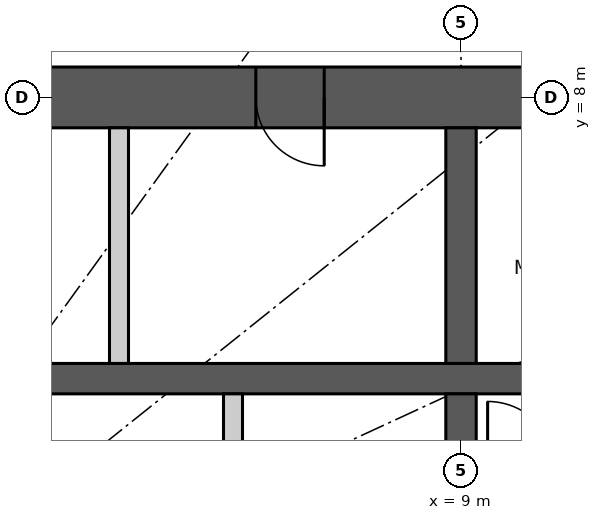
"""IFC4 building model, lengths in metres.
Left out: names, types, materials, properties, quantities, classifications, styles, units other than length and angle.
Written with IfcOpenShell. Run it as: python <this file> out.ifc"""

import sys

from ifc_helpers import new_model, si_unit, direction, frame, frame_2d, origin, place, context, subcontext, project, spatial, rectangle, extrude, element, fill, save


model = new_model("IFC4")
c1 = context("Model", 3, precision=1e-05, world=origin(), true_north=direction((0.0, 1.0)))
c2 = subcontext(c1, "Body", "Model", "MODEL_VIEW")
j1 = project(units=[si_unit("LENGTHUNIT", "METRE"), si_unit("PLANEANGLEUNIT", "RADIAN")], contexts=[c1])
p1 = place(None, origin())
s1 = spatial("IfcSite", under=j1, at=p1, CompositionType="ELEMENT")
p2 = place(p1, origin())
s2 = spatial("IfcBuilding", under=s1, at=p2, CompositionType="ELEMENT")
p3 = place(p2, frame((0.0, 0.0, 159.9)))
s3 = spatial("IfcBuildingStorey", under=s2, at=p3, CompositionType="ELEMENT", Elevation=159.9)
p4 = place(p3, frame((-12.4, 8.0, 0.0), z_axis=(0.0, 0.0, 1.0), x_axis=(1.0, 0.0, 0.0)))
e1 = element("IfcWall", 1, at=p4, inside=s3, PredefinedType="SHEAR", context=c2, shape_type="SweptSolid", body=[
    extrude(rectangle(XDim=24.8, YDim=0.8, at=frame_2d((12.4, 0.0))), origin(), (0.0, 0.0, 1.0), 3.3),
])
p5 = place(p4, frame((11.1, 0.0, 0.0)))
e2 = element("IfcOpeningElement", 2, at=p5, cuts=e1, PredefinedType="OPENING", context=c2, shape_type="SweptSolid", body=[
    extrude(rectangle(XDim=1.2, YDim=2.2, at=frame_2d((0.6, 1.1))), frame((0.0, 0.41, 0.0), z_axis=(0.0, -1.0, 0.0), x_axis=(1.0, 0.0, 0.0)), (0.0, 0.0, 1.0), 0.82),
])
p6 = place(p4, frame((18.7, 0.0, 0.0)))
e3 = element("IfcOpeningElement", 3, at=p6, cuts=e1, PredefinedType="OPENING", context=c2, shape_type="SweptSolid", body=[
    extrude(rectangle(XDim=0.9, YDim=2.2, at=frame_2d((0.45, 1.1))), frame((0.0, 0.41, 0.0), z_axis=(0.0, -1.0, 0.0), x_axis=(1.0, 0.0, 0.0)), (0.0, 0.0, 1.0), 0.82),
])
p7 = place(p3, frame((-11.6, 4.3, 0.0), z_axis=(0.0, 0.0, 1.0), x_axis=(1.0, 0.0, 0.0)))
e4 = element("IfcWall", 4, at=p7, inside=s3, PredefinedType="SHEAR", context=c2, shape_type="SweptSolid", body=[
    extrude(rectangle(XDim=23.2, YDim=0.4, at=frame_2d((11.6, 0.0))), origin(), (0.0, 0.0, 1.0), 3.3),
])
p8 = place(p3, frame((9.0, 4.5, 0.0), z_axis=(0.0, 0.0, 1.0), x_axis=(0.0, 1.0, 0.0)))
e5 = element("IfcWall", 5, at=p8, inside=s3, PredefinedType="SHEAR", context=c2, shape_type="SweptSolid", body=[
    extrude(rectangle(XDim=3.1, YDim=0.4, at=frame_2d((1.55, 0.0))), origin(), (0.0, 0.0, 1.0), 3.3),
])
p9 = place(p3, frame((9.0, 1.75, 0.0), z_axis=(0.0, 0.0, 1.0), x_axis=(0.0, 1.0, 0.0)))
e6 = element("IfcWall", 6, at=p9, inside=s3, PredefinedType="SHEAR", context=c2, shape_type="SweptSolid", body=[
    extrude(rectangle(XDim=2.35, YDim=0.4, at=frame_2d((1.175, 0.0))), origin(), (0.0, 0.0, 1.0), 3.3),
])
p10 = place(p3, frame((4.5, 4.5, 0.0), z_axis=(0.0, 0.0, 1.0), x_axis=(0.0, 1.0, 0.0)))
e7 = element("IfcWall", 7, at=p10, inside=s3, PredefinedType="PARTITIONING", context=c2, shape_type="SweptSolid", body=[
    extrude(rectangle(XDim=3.1, YDim=0.25, at=frame_2d((1.55, 0.0))), origin(), (0.0, 0.0, 1.0), 3.3),
])
p11 = place(p3, frame((6.0, 1.75, 0.0), z_axis=(0.0, 0.0, 1.0), x_axis=(0.0, 1.0, 0.0)))
e8 = element("IfcWall", 8, at=p11, inside=s3, PredefinedType="PARTITIONING", context=c2, shape_type="SweptSolid", body=[
    extrude(rectangle(XDim=2.35, YDim=0.25, at=frame_2d((1.175, 0.0))), origin(), (0.0, 0.0, 1.0), 3.3),
])
p12 = place(p6, origin())
e9 = element("IfcDoor", 9, at=p12, inside=s3, OperationType="SINGLE_SWING_RIGHT", PredefinedType="DOOR", context=c2, shape_type="SweptSolid", body=[
    extrude(rectangle(XDim=0.9, YDim=2.2, at=frame_2d((0.45, 1.1))), frame((0.0, 0.025, 0.0), z_axis=(0.0, -1.0, 0.0), x_axis=(1.0, 0.0, 0.0)), (0.0, 0.0, 1.0), 0.05),
])
fill(e3, e9)
save(model, sys.argv[1])
